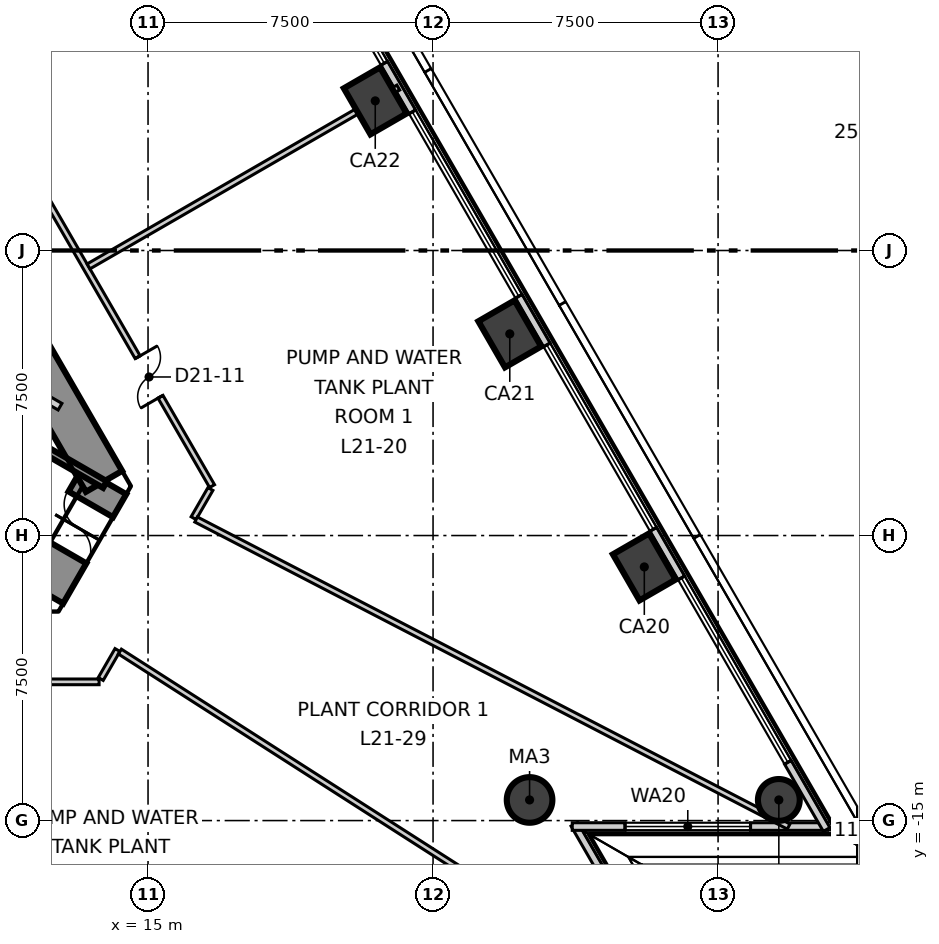
"""IFC4 building model, lengths in metres.
Left out: names, types, materials, properties, quantities, classifications, styles, units other than length and angle.
Written with IfcOpenShell. Run it as: python <this file> out.ifc"""

import sys

from ifc_helpers import new_model, si_unit, direction, frame, frame_2d, origin, origin_2d, place, context, subcontext, project, spatial, polyline, rectangle, circle, outline, extrude, element, fill, save


model = new_model("IFC4")
c1 = context("Model", 3, precision=1e-05, world=origin(), true_north=direction((0.0, 1.0)))
c2 = subcontext(c1, "Body", "Model", "MODEL_VIEW")
j1 = project(units=[si_unit("LENGTHUNIT", "METRE"), si_unit("PLANEANGLEUNIT", "RADIAN")], contexts=[c1])
p1 = place(None, origin())
s1 = spatial("IfcSite", under=j1, at=p1, CompositionType="ELEMENT")
p2 = place(p1, origin())
s2 = spatial("IfcBuilding", under=s1, at=p2, CompositionType="ELEMENT")
p3 = place(p2, frame((0.0, 0.0, 95.3)))
s3 = spatial("IfcBuildingStorey", under=s2, at=p3, CompositionType="ELEMENT", Elevation=95.3)
p4 = place(p3, frame((-12.182, -8.95, -0.3), z_axis=(0.0, 0.0, 1.0), x_axis=(1.0, 0.0, 0.0)))
e1 = element("IfcWall", 1, at=p4, inside=s3, PredefinedType="SHEAR", context=c2, shape_type="SweptSolid", body=[
    extrude(outline(polyline([(-0.462, -0.55), (1.483, -0.55), (3.428, -0.55), (5.374, -0.55), (7.319, -0.55), (9.264, -0.55), (11.209, -0.55), (13.155, -0.55), (15.1, -0.55), (17.045, -0.55), (18.99, -0.55), (20.936, -0.55), (22.881, -0.55), (24.826, -0.55), (23.902, 0.55), (21.949, 0.55), (19.995, 0.55), (18.042, 0.55), (16.089, 0.55), (14.135, 0.55), (12.182, 0.55), (10.229, 0.55), (8.275, 0.55), (6.322, 0.55), (4.369, 0.55), (2.415, 0.55), (0.462, 0.55), (-0.462, -0.55)])), origin(), (0.0, 0.0, 1.0), 4.2),
])
p5 = place(p3, frame((12.182, -8.95, -0.3), z_axis=(0.0, 0.0, 1.0), x_axis=(0.500061949227, 0.865989634427, 0.0)))
e2 = element("IfcWall", 2, at=p5, inside=s3, PredefinedType="SHEAR", context=c2, shape_type="SweptSolid", body=[
    extrude(outline(polyline([(-0.245, -0.675), (1.66, -0.675), (3.565, -0.675), (3.075, 0.675), (1.66, 0.675), (0.245, 0.675), (-0.245, -0.675)])), origin(), (0.0, 0.0, 1.0), 4.2),
])
p6 = place(p5, frame((1.221, 0.0, 0.3)))
e3 = element("IfcOpeningElement", 3, at=p6, cuts=e2, PredefinedType="OPENING", context=c2, shape_type="SweptSolid", body=[
    extrude(rectangle(XDim=1.4, YDim=2.1, at=frame_2d((0.7, 1.05))), frame((0.0, 0.685, 0.0), z_axis=(0.0, -1.0, 0.0), x_axis=(1.0, 0.0, 0.0)), (0.0, 0.0, 1.0), 1.37),
])
p7 = place(p3, frame((13.842, -6.075, -0.3), z_axis=(0.0, 0.0, 1.0), x_axis=(-0.500003780125, 0.866023221317, 0.0)))
e4 = element("IfcWall", 4, at=p7, inside=s3, PredefinedType="SHEAR", context=c2, shape_type="SweptSolid", body=[
    extrude(outline(polyline([(-0.462, -0.55), (1.483, -0.55), (3.428, -0.55), (5.374, -0.55), (7.319, -0.55), (9.264, -0.55), (11.209, -0.55), (13.155, -0.55), (15.1, -0.55), (17.045, -0.55), (18.99, -0.55), (20.936, -0.55), (22.881, -0.55), (24.826, -0.55), (23.902, 0.55), (21.949, 0.55), (19.995, 0.55), (18.042, 0.55), (16.089, 0.55), (14.135, 0.55), (12.182, 0.55), (10.229, 0.55), (8.275, 0.55), (6.322, 0.55), (4.369, 0.55), (2.415, 0.55), (0.462, 0.55), (-0.462, -0.55)])), origin(), (0.0, 0.0, 1.0), 4.2),
])
p8 = place(p7, frame((11.426, 0.0, 0.3)))
e5 = element("IfcOpeningElement", 5, at=p8, cuts=e4, PredefinedType="OPENING", context=c2, shape_type="SweptSolid", body=[
    extrude(rectangle(XDim=1.8, YDim=2.1, at=frame_2d((0.9, 1.05))), frame((0.0, 0.56, 0.0), z_axis=(0.0, -1.0, 0.0), x_axis=(1.0, 0.0, 0.0)), (0.0, 0.0, 1.0), 1.12),
])
p9 = place(p3, frame((31.599, -14.457, -0.3), z_axis=(0.0, 0.0, 1.0), x_axis=(-0.5, 0.866025403784, 0.0)))
e6 = element("IfcColumn", 6, at=p9, inside=s3, PredefinedType="COLUMN", context=c2, shape_type="SweptSolid", body=[
    extrude(circle(Radius=0.55, at=origin_2d()), origin(), (0.0, 0.0, 1.0), 4.2),
])
for number, where, z_axis, x_axis in (
    (7, (28.059, -8.326, -0.3), (0.0, 0.0, 1.0), (-0.5, 0.866, 0.0)),
    (8, (24.519, -2.194, -0.3), (0.0, 0.0, 1.0), (-0.5, 0.866, 0.0)),
    (9, (20.979, 3.937, -0.3), (0.0, 0.0, 1.0), (-0.5, 0.866, 0.0)),
):
    element("IfcColumn", number, at=place(p3, frame(where, z_axis=z_axis, x_axis=x_axis)), inside=s3, PredefinedType="COLUMN", context=c2, shape_type="SweptSolid", body=[
        extrude(rectangle(XDim=1.4, YDim=1.1, at=origin_2d()), origin(), (0.0, 0.0, 1.0), 4.2),
    ])
p10 = place(p3, frame((25.04, -14.457, -0.3), z_axis=(0.0, 0.0, 1.0), x_axis=(1.0, 0.0, 0.0)))
e10 = element("IfcColumn", 10, at=p10, inside=s3, PredefinedType="COLUMN", context=c2, shape_type="SweptSolid", body=[
    extrude(circle(Radius=0.6, at=origin_2d()), origin(), (0.0, 0.0, 1.0), 4.2),
])
p11 = place(p3, frame((29.577, -20.915, 0.0), z_axis=(0.0, 0.0, 1.0), x_axis=(-0.499914325741, 0.866074862191, 0.0)))
e11 = element("IfcWall", 11, at=p11, inside=s3, PredefinedType="ELEMENTEDWALL", context=c2, shape_type="SweptSolid", body=[
    extrude(rectangle(XDim=6.719, YDim=0.2, at=frame_2d((3.359, 0.0))), origin(), (0.0, 0.0, 1.0), 3.9),
])
p12 = place(p11, frame((1.99, 0.0, 0.9)))
e12 = element("IfcOpeningElement", 12, at=p12, cuts=e11, PredefinedType="OPENING", context=c2, shape_type="SweptSolid", body=[
    extrude(rectangle(XDim=3.3, YDim=2.5, at=frame_2d((1.65, 1.25))), frame((0.0, 0.11, 0.0), z_axis=(0.0, -1.0, 0.0), x_axis=(1.0, 0.0, 0.0)), (0.0, 0.0, 1.0), 0.22),
])
p13 = place(p3, frame((26.163, -15.157, 0.0), z_axis=(0.0, 0.0, 1.0), x_axis=(1.0, 0.0, 0.0)))
e13 = element("IfcWall", 13, at=p13, inside=s3, PredefinedType="ELEMENTEDWALL", context=c2, shape_type="SweptSolid", body=[
    extrude(rectangle(XDim=6.719, YDim=0.2, at=frame_2d((3.359, 0.0))), origin(), (0.0, 0.0, 1.0), 3.9),
])
p14 = place(p13, frame((1.39, 0.0, 0.9)))
e14 = element("IfcOpeningElement", 14, at=p14, cuts=e13, PredefinedType="OPENING", context=c2, shape_type="SweptSolid", body=[
    extrude(rectangle(XDim=3.3, YDim=2.5, at=frame_2d((1.65, 1.25))), frame((0.0, 0.11, 0.0), z_axis=(0.0, -1.0, 0.0), x_axis=(1.0, 0.0, 0.0)), (0.0, 0.0, 1.0), 0.22),
])
p15 = place(p3, frame((32.857, -15.235, 0.0), z_axis=(0.0, 0.0, 1.0), x_axis=(-0.500009108245, 0.866020145073, 0.0)))
e15 = element("IfcWall", 15, at=p15, inside=s3, PredefinedType="ELEMENTEDWALL", context=c2, shape_type="SweptSolid", body=[
    extrude(rectangle(XDim=59.225, YDim=0.2, at=frame_2d((29.613, 0.0))), origin(), (0.0, 0.0, 1.0), 3.9),
])
p16 = place(p15, frame((2.043, 0.0, 0.9)))
e16 = element("IfcOpeningElement", 16, at=p16, cuts=e15, PredefinedType="OPENING", context=c2, shape_type="SweptSolid", body=[
    extrude(rectangle(XDim=5.6, YDim=2.5, at=frame_2d((2.8, 1.25))), frame((0.0, 0.11, 0.0), z_axis=(0.0, -1.0, 0.0), x_axis=(1.0, 0.0, 0.0)), (0.0, 0.0, 1.0), 0.22),
])
p17 = place(p15, frame((9.123, 0.0, 0.9)))
e17 = element("IfcOpeningElement", 17, at=p17, cuts=e15, PredefinedType="OPENING", context=c2, shape_type="SweptSolid", body=[
    extrude(rectangle(XDim=5.6, YDim=2.5, at=frame_2d((2.8, 1.25))), frame((0.0, 0.11, 0.0), z_axis=(0.0, -1.0, 0.0), x_axis=(1.0, 0.0, 0.0)), (0.0, 0.0, 1.0), 0.22),
])
p18 = place(p15, frame((16.203, 0.0, 0.9)))
e18 = element("IfcOpeningElement", 18, at=p18, cuts=e15, PredefinedType="OPENING", context=c2, shape_type="SweptSolid", body=[
    extrude(rectangle(XDim=5.6, YDim=2.5, at=frame_2d((2.8, 1.25))), frame((0.0, 0.11, 0.0), z_axis=(0.0, -1.0, 0.0), x_axis=(1.0, 0.0, 0.0)), (0.0, 0.0, 1.0), 0.22),
])
p19 = place(p15, frame((23.282, 0.0, 0.9)))
e19 = element("IfcOpeningElement", 19, at=p19, cuts=e15, PredefinedType="OPENING", context=c2, shape_type="SweptSolid", body=[
    extrude(rectangle(XDim=5.6, YDim=2.5, at=frame_2d((2.8, 1.25))), frame((0.0, 0.11, 0.0), z_axis=(0.0, -1.0, 0.0), x_axis=(1.0, 0.0, 0.0)), (0.0, 0.0, 1.0), 0.22),
])
p20 = place(p15, frame((30.362, 0.0, 0.9)))
e20 = element("IfcOpeningElement", 20, at=p20, cuts=e15, PredefinedType="OPENING", context=c2, shape_type="SweptSolid", body=[
    extrude(rectangle(XDim=5.6, YDim=2.5, at=frame_2d((2.8, 1.25))), frame((0.0, 0.11, 0.0), z_axis=(0.0, -1.0, 0.0), x_axis=(1.0, 0.0, 0.0)), (0.0, 0.0, 1.0), 0.22),
])
p21 = place(p15, frame((37.442, 0.0, 0.9)))
e21 = element("IfcOpeningElement", 21, at=p21, cuts=e15, PredefinedType="OPENING", context=c2, shape_type="SweptSolid", body=[
    extrude(rectangle(XDim=5.6, YDim=2.5, at=frame_2d((2.8, 1.25))), frame((0.0, 0.11, 0.0), z_axis=(0.0, -1.0, 0.0), x_axis=(1.0, 0.0, 0.0)), (0.0, 0.0, 1.0), 0.22),
])
p22 = place(p15, frame((44.522, 0.0, 0.9)))
e22 = element("IfcOpeningElement", 22, at=p22, cuts=e15, PredefinedType="OPENING", context=c2, shape_type="SweptSolid", body=[
    extrude(rectangle(XDim=5.6, YDim=2.5, at=frame_2d((2.8, 1.25))), frame((0.0, 0.11, 0.0), z_axis=(0.0, -1.0, 0.0), x_axis=(1.0, 0.0, 0.0)), (0.0, 0.0, 1.0), 0.22),
])
p23 = place(p15, frame((51.602, 0.0, 0.9)))
e23 = element("IfcOpeningElement", 23, at=p23, cuts=e15, PredefinedType="OPENING", context=c2, shape_type="SweptSolid", body=[
    extrude(rectangle(XDim=5.6, YDim=2.5, at=frame_2d((2.8, 1.25))), frame((0.0, 0.11, 0.0), z_axis=(0.0, -1.0, 0.0), x_axis=(1.0, 0.0, 0.0)), (0.0, 0.0, 1.0), 0.22),
])
p24 = place(p3, frame((-13.625, -11.35, 0.0), z_axis=(0.0, 0.0, 1.0), x_axis=(1.0, 0.0, 0.0)))
e24 = element("IfcWall", 24, at=p24, inside=s3, PredefinedType="PARTITIONING", context=c2, shape_type="SweptSolid", body=[
    extrude(rectangle(XDim=27.337, YDim=0.15, at=frame_2d((13.668, 0.0))), origin(), (0.0, 0.0, 1.0), 3.9),
])
p25 = place(p24, frame((2.629, 0.0, 0.0)))
e25 = element("IfcOpeningElement", 25, at=p25, cuts=e24, PredefinedType="OPENING", context=c2, shape_type="SweptSolid", body=[
    extrude(rectangle(XDim=1.2, YDim=2.1, at=frame_2d((0.6, 1.05))), frame((0.0, 0.085, 0.0), z_axis=(0.0, -1.0, 0.0), x_axis=(1.0, 0.0, 0.0)), (0.0, 0.0, 1.0), 0.17),
])
p26 = place(p24, frame((13.025, 0.0, 0.0)))
e26 = element("IfcOpeningElement", 26, at=p26, cuts=e24, PredefinedType="OPENING", context=c2, shape_type="SweptSolid", body=[
    extrude(rectangle(XDim=1.2, YDim=2.1, at=frame_2d((0.6, 1.05))), frame((0.0, 0.085, 0.0), z_axis=(0.0, -1.0, 0.0), x_axis=(1.0, 0.0, 0.0)), (0.0, 0.0, 1.0), 0.17),
])
p27 = place(p24, frame((23.421, 0.0, 0.0)))
e27 = element("IfcOpeningElement", 27, at=p27, cuts=e24, PredefinedType="OPENING", context=c2, shape_type="SweptSolid", body=[
    extrude(rectangle(XDim=1.2, YDim=2.1, at=frame_2d((0.6, 1.05))), frame((0.0, 0.085, 0.0), z_axis=(0.0, -1.0, 0.0), x_axis=(1.0, 0.0, 0.0)), (0.0, 0.0, 1.0), 0.17),
])
p28 = place(p3, frame((3.017, 17.475, 0.0), z_axis=(0.0, 0.0, 1.0), x_axis=(0.499977309191, -0.866038503933, 0.0)))
e28 = element("IfcWall", 28, at=p28, inside=s3, PredefinedType="PARTITIONING", context=c2, shape_type="SweptSolid", body=[
    extrude(rectangle(XDim=27.337, YDim=0.15, at=frame_2d((13.668, 0.0))), origin(), (0.0, 0.0, 1.0), 3.9),
])
p29 = place(p28, frame((23.421, 0.0, 0.0)))
e29 = element("IfcOpeningElement", 29, at=p29, cuts=e28, PredefinedType="OPENING", context=c2, shape_type="SweptSolid", body=[
    extrude(rectangle(XDim=1.2, YDim=2.1, at=frame_2d((0.6, 1.05))), frame((0.0, 0.085, 0.0), z_axis=(0.0, -1.0, 0.0), x_axis=(1.0, 0.0, 0.0)), (0.0, 0.0, 1.0), 0.17),
])
p30 = place(p28, frame((13.025, 0.0, 0.0)))
e30 = element("IfcOpeningElement", 30, at=p30, cuts=e28, PredefinedType="OPENING", context=c2, shape_type="SweptSolid", body=[
    extrude(rectangle(XDim=1.2, YDim=2.1, at=frame_2d((0.6, 1.05))), frame((0.0, 0.085, 0.0), z_axis=(0.0, -1.0, 0.0), x_axis=(1.0, 0.0, 0.0)), (0.0, 0.0, 1.0), 0.17),
])
p31 = place(p28, frame((2.629, 0.0, 0.0)))
e31 = element("IfcOpeningElement", 31, at=p31, cuts=e28, PredefinedType="OPENING", context=c2, shape_type="SweptSolid", body=[
    extrude(rectangle(XDim=1.2, YDim=2.1, at=frame_2d((0.6, 1.05))), frame((0.0, 0.085, 0.0), z_axis=(0.0, -1.0, 0.0), x_axis=(1.0, 0.0, 0.0)), (0.0, 0.0, 1.0), 0.17),
])
p32 = place(p3, frame((13.755, -11.275, 0.0), z_axis=(0.0, 0.0, 1.0), x_axis=(0.500577563191, 0.865691690632, 0.0)))
e32 = element("IfcWall", 32, at=p32, inside=s3, PredefinedType="PARTITIONING", context=c2, shape_type="SweptSolid", body=[
    extrude(rectangle(XDim=0.881, YDim=0.15, at=frame_2d((0.441, 0.0))), origin(), (0.0, 0.0, 1.0), 3.9),
])
p33 = place(p3, frame((16.199, -7.043, 0.0), z_axis=(0.0, 0.0, 1.0), x_axis=(0.49972245349, 0.866185586049, 0.0)))
e33 = element("IfcWall", 33, at=p33, inside=s3, PredefinedType="PARTITIONING", context=c2, shape_type="SweptSolid", body=[
    extrude(rectangle(XDim=0.887, YDim=0.15, at=frame_2d((0.443, 0.0))), origin(), (0.0, 0.0, 1.0), 3.9),
])
p34 = place(p3, frame((14.259, -10.553, 0.0), z_axis=(0.0, 0.0, 1.0), x_axis=(0.842155907039, -0.539234112644, 0.0)))
e34 = element("IfcWall", 34, at=p34, inside=s3, PredefinedType="PARTITIONING", context=c2, shape_type="SweptSolid", body=[
    extrude(rectangle(XDim=17.586, YDim=0.15, at=frame_2d((8.793, 0.0))), origin(), (0.0, 0.0, 1.0), 3.1),
])
p35 = place(p3, frame((13.434, -0.419, 0.0), z_axis=(0.0, 0.0, 1.0), x_axis=(0.866018845103, 0.500011359798, 0.0)))
e35 = element("IfcWall", 35, at=p35, inside=s3, PredefinedType="PARTITIONING", context=c2, shape_type="SweptSolid", body=[
    extrude(rectangle(XDim=9.412, YDim=0.15, at=frame_2d((4.706, 0.0))), origin(), (0.0, 0.0, 1.0), 3.9),
])
p36 = place(p3, frame((16.265, -7.078, 0.0), z_axis=(0.0, 0.0, 1.0), x_axis=(0.887886216107, -0.460063112243, 0.0)))
e36 = element("IfcWall", 36, at=p36, inside=s3, PredefinedType="PARTITIONING", context=c2, shape_type="SweptSolid", body=[
    extrude(rectangle(XDim=17.561, YDim=0.15, at=frame_2d((8.78, 0.0))), origin(), (0.0, 0.0, 1.0), 3.1),
])
p37 = place(p3, frame((7.683, -1.222, 0.0), z_axis=(0.0, 0.0, 1.0), x_axis=(0.865960281868, -0.500112777509, 0.0)))
e37 = element("IfcWall", 37, at=p37, inside=s3, PredefinedType="SOLIDWALL", context=c2, shape_type="SweptSolid", body=[
    extrude(rectangle(XDim=5.775, YDim=0.2, at=frame_2d((2.888, 0.0))), origin(), (0.0, 0.0, 1.0), 3.25),
])
p38 = place(p3, frame((6.529, -1.922, 0.0), z_axis=(0.0, 0.0, 1.0), x_axis=(0.866010926821, -0.500025073997, 0.0)))
e38 = element("IfcWall", 38, at=p38, inside=s3, PredefinedType="SOLIDWALL", context=c2, shape_type="SweptSolid", body=[
    extrude(rectangle(XDim=8.473, YDim=0.2, at=frame_2d((4.237, 0.0))), origin(), (0.0, 0.0, 1.0), 3.9),
])
p39 = place(p14, origin())
e39 = element("IfcWindow", 39, at=p39, inside=s3, PartitioningType="SINGLE_PANEL", PredefinedType="WINDOW", context=c2, shape_type="SweptSolid", body=[
    extrude(rectangle(XDim=3.3, YDim=2.5, at=frame_2d((1.65, 1.25))), frame((0.0, 0.03, 0.0), z_axis=(0.0, -1.0, 0.0), x_axis=(1.0, 0.0, 0.0)), (0.0, 0.0, 1.0), 0.06),
])
fill(e14, e39)
p40 = place(p16, origin())
e40 = element("IfcWindow", 40, at=p40, inside=s3, PartitioningType="SINGLE_PANEL", PredefinedType="WINDOW", context=c2, shape_type="SweptSolid", body=[
    extrude(rectangle(XDim=5.6, YDim=2.5, at=frame_2d((2.8, 1.25))), frame((0.0, 0.03, 0.0), z_axis=(0.0, -1.0, 0.0), x_axis=(1.0, 0.0, 0.0)), (0.0, 0.0, 1.0), 0.06),
])
fill(e16, e40)
p41 = place(p17, origin())
e41 = element("IfcWindow", 41, at=p41, inside=s3, PartitioningType="SINGLE_PANEL", PredefinedType="WINDOW", context=c2, shape_type="SweptSolid", body=[
    extrude(rectangle(XDim=5.6, YDim=2.5, at=frame_2d((2.8, 1.25))), frame((0.0, 0.03, 0.0), z_axis=(0.0, -1.0, 0.0), x_axis=(1.0, 0.0, 0.0)), (0.0, 0.0, 1.0), 0.06),
])
fill(e17, e41)
p42 = place(p18, origin())
e42 = element("IfcWindow", 42, at=p42, inside=s3, PartitioningType="SINGLE_PANEL", PredefinedType="WINDOW", context=c2, shape_type="SweptSolid", body=[
    extrude(rectangle(XDim=5.6, YDim=2.5, at=frame_2d((2.8, 1.25))), frame((0.0, 0.03, 0.0), z_axis=(0.0, -1.0, 0.0), x_axis=(1.0, 0.0, 0.0)), (0.0, 0.0, 1.0), 0.06),
])
fill(e18, e42)
p43 = place(p19, origin())
e43 = element("IfcWindow", 43, at=p43, inside=s3, PartitioningType="SINGLE_PANEL", PredefinedType="WINDOW", context=c2, shape_type="SweptSolid", body=[
    extrude(rectangle(XDim=5.6, YDim=2.5, at=frame_2d((2.8, 1.25))), frame((0.0, 0.03, 0.0), z_axis=(0.0, -1.0, 0.0), x_axis=(1.0, 0.0, 0.0)), (0.0, 0.0, 1.0), 0.06),
])
fill(e19, e43)
p44 = place(p29, origin())
e44 = element("IfcDoor", 44, at=p44, inside=s3, OperationType="DOUBLE_DOOR_SINGLE_SWING", PredefinedType="DOOR", context=c2, shape_type="SweptSolid", body=[
    extrude(rectangle(XDim=1.2, YDim=2.1, at=frame_2d((0.6, 1.05))), frame((0.0, 0.025, 0.0), z_axis=(0.0, -1.0, 0.0), x_axis=(1.0, 0.0, 0.0)), (0.0, 0.0, 1.0), 0.05),
])
fill(e29, e44)
p45 = place(p6, origin())
e45 = element("IfcDoor", 45, at=p45, inside=s3, OperationType="DOUBLE_DOOR_SINGLE_SWING", PredefinedType="DOOR", context=c2, shape_type="SweptSolid", body=[
    extrude(rectangle(XDim=1.4, YDim=2.1, at=frame_2d((0.7, 1.05))), frame((0.0, 0.025, 0.0), z_axis=(0.0, -1.0, 0.0), x_axis=(1.0, 0.0, 0.0)), (0.0, 0.0, 1.0), 0.05),
])
fill(e3, e45)
save(model, sys.argv[1])
